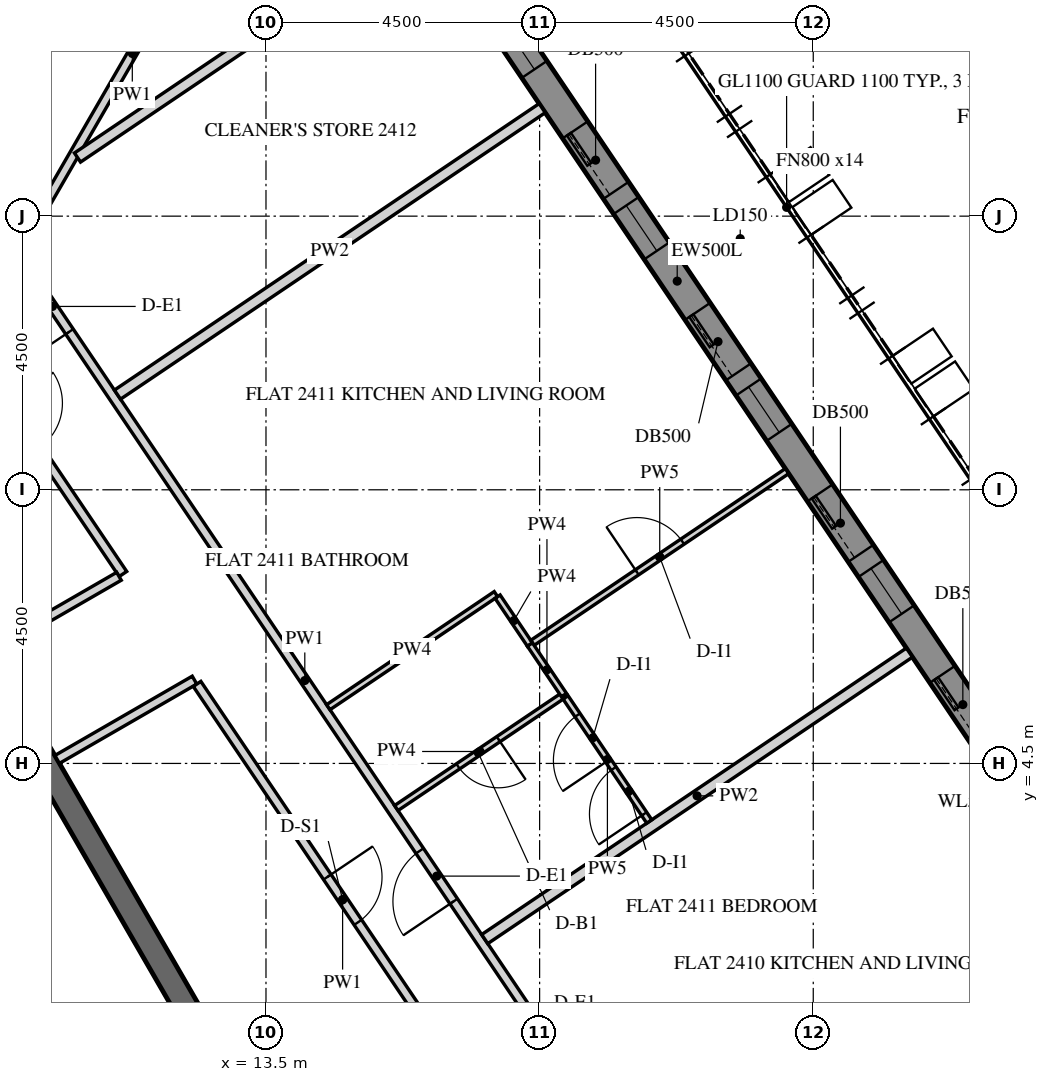
"""IFC4 building model, lengths in metres.
Left out: names, types, materials, properties, quantities, classifications, styles, units other than length and angle.
Written with IfcOpenShell. Run it as: python <this file> out.ifc"""

import sys

from ifc_helpers import new_model, si_unit, direction, frame, frame_2d, origin, place, context, subcontext, project, spatial, polyline, rectangle, outline, extrude, element, fill, save


model = new_model("IFC4")
c1 = context("Model", 3, precision=1e-05, world=origin(), true_north=direction((0.0, 1.0)))
c2 = subcontext(c1, "Body", "Model", "MODEL_VIEW")
j1 = project(units=[si_unit("LENGTHUNIT", "METRE"), si_unit("PLANEANGLEUNIT", "RADIAN")], contexts=[c1])
p1 = place(None, origin())
s1 = spatial("IfcSite", under=j1, at=p1, CompositionType="ELEMENT")
p2 = place(p1, origin())
s2 = spatial("IfcBuilding", under=s1, at=p2, CompositionType="ELEMENT")
p3 = place(p2, frame((0.0, 0.0, 303.0)))
s3 = spatial("IfcBuildingStorey", under=s2, at=p3, CompositionType="ELEMENT", Elevation=303.0)
p4 = place(p3, frame((26.706, 2.879, -0.15), z_axis=(0.0, 0.0, 1.0), x_axis=(-0.559197891507, 0.829034208061, 0.0)))
e1 = element("IfcWall", 1, at=p4, inside=s3, PredefinedType="SOLIDWALL", context=c2, shape_type="SweptSolid", body=[
    extrude(outline(polyline([(0.25, -0.25), (22.795, -0.25), (23.295, 0.25), (-0.25, 0.25), (0.25, -0.25)])), origin(), (0.0, 0.0, 1.0), 3.9),
])
p5 = place(p4, frame((1.323, 0.0, 1.05)))
e2 = element("IfcOpeningElement", 2, at=p5, cuts=e1, PredefinedType="OPENING", context=c2, shape_type="SweptSolid", body=[
    extrude(rectangle(XDim=0.9, YDim=1.5, at=frame_2d((0.45, 0.75))), frame((0.0, 0.26, 0.0), z_axis=(0.0, -1.0, 0.0), x_axis=(1.0, 0.0, 0.0)), (0.0, 0.0, 1.0), 0.52),
])
p6 = place(p4, frame((2.522, 0.0, 0.15)))
e3 = element("IfcOpeningElement", 3, at=p6, cuts=e1, PredefinedType="OPENING", context=c2, shape_type="SweptSolid", body=[
    extrude(rectangle(XDim=1.2, YDim=2.4, at=frame_2d((0.6, 1.2))), frame((0.0, 0.26, 0.0), z_axis=(0.0, -1.0, 0.0), x_axis=(1.0, 0.0, 0.0)), (0.0, 0.0, 1.0), 0.52),
])
p7 = place(p4, frame((4.922, 0.0, 1.05)))
e4 = element("IfcOpeningElement", 4, at=p7, cuts=e1, PredefinedType="OPENING", context=c2, shape_type="SweptSolid", body=[
    extrude(rectangle(XDim=0.9, YDim=1.5, at=frame_2d((0.45, 0.75))), frame((0.0, 0.26, 0.0), z_axis=(0.0, -1.0, 0.0), x_axis=(1.0, 0.0, 0.0)), (0.0, 0.0, 1.0), 0.52),
])
p8 = place(p4, frame((6.122, 0.0, 0.15)))
e5 = element("IfcOpeningElement", 5, at=p8, cuts=e1, PredefinedType="OPENING", context=c2, shape_type="SweptSolid", body=[
    extrude(rectangle(XDim=1.2, YDim=2.4, at=frame_2d((0.6, 1.2))), frame((0.0, 0.26, 0.0), z_axis=(0.0, -1.0, 0.0), x_axis=(1.0, 0.0, 0.0)), (0.0, 0.0, 1.0), 0.52),
])
p9 = place(p4, frame((8.522, 0.0, 1.05)))
e6 = element("IfcOpeningElement", 6, at=p9, cuts=e1, PredefinedType="OPENING", context=c2, shape_type="SweptSolid", body=[
    extrude(rectangle(XDim=0.9, YDim=1.5, at=frame_2d((0.45, 0.75))), frame((0.0, 0.26, 0.0), z_axis=(0.0, -1.0, 0.0), x_axis=(1.0, 0.0, 0.0)), (0.0, 0.0, 1.0), 0.52),
])
p10 = place(p4, frame((9.722, 0.0, 0.15)))
e7 = element("IfcOpeningElement", 7, at=p10, cuts=e1, PredefinedType="OPENING", context=c2, shape_type="SweptSolid", body=[
    extrude(rectangle(XDim=1.2, YDim=2.4, at=frame_2d((0.6, 1.2))), frame((0.0, 0.26, 0.0), z_axis=(0.0, -1.0, 0.0), x_axis=(1.0, 0.0, 0.0)), (0.0, 0.0, 1.0), 0.52),
])
p11 = place(p4, frame((12.122, 0.0, 1.05)))
e8 = element("IfcOpeningElement", 8, at=p11, cuts=e1, PredefinedType="OPENING", context=c2, shape_type="SweptSolid", body=[
    extrude(rectangle(XDim=0.9, YDim=1.5, at=frame_2d((0.45, 0.75))), frame((0.0, 0.26, 0.0), z_axis=(0.0, -1.0, 0.0), x_axis=(1.0, 0.0, 0.0)), (0.0, 0.0, 1.0), 0.52),
])
p12 = place(p4, frame((13.323, 0.0, 0.15)))
e9 = element("IfcOpeningElement", 9, at=p12, cuts=e1, PredefinedType="OPENING", context=c2, shape_type="SweptSolid", body=[
    extrude(rectangle(XDim=1.2, YDim=2.4, at=frame_2d((0.6, 1.2))), frame((0.0, 0.26, 0.0), z_axis=(0.0, -1.0, 0.0), x_axis=(1.0, 0.0, 0.0)), (0.0, 0.0, 1.0), 0.52),
])
p13 = place(p4, frame((15.722, 0.0, 1.05)))
e10 = element("IfcOpeningElement", 10, at=p13, cuts=e1, PredefinedType="OPENING", context=c2, shape_type="SweptSolid", body=[
    extrude(rectangle(XDim=0.9, YDim=1.5, at=frame_2d((0.45, 0.75))), frame((0.0, 0.26, 0.0), z_axis=(0.0, -1.0, 0.0), x_axis=(1.0, 0.0, 0.0)), (0.0, 0.0, 1.0), 0.52),
])
p14 = place(p4, frame((16.922, 0.0, 0.15)))
e11 = element("IfcOpeningElement", 11, at=p14, cuts=e1, PredefinedType="OPENING", context=c2, shape_type="SweptSolid", body=[
    extrude(rectangle(XDim=1.2, YDim=2.4, at=frame_2d((0.6, 1.2))), frame((0.0, 0.26, 0.0), z_axis=(0.0, -1.0, 0.0), x_axis=(1.0, 0.0, 0.0)), (0.0, 0.0, 1.0), 0.52),
])
p15 = place(p4, frame((19.323, 0.0, 1.05)))
e12 = element("IfcOpeningElement", 12, at=p15, cuts=e1, PredefinedType="OPENING", context=c2, shape_type="SweptSolid", body=[
    extrude(rectangle(XDim=0.9, YDim=1.5, at=frame_2d((0.45, 0.75))), frame((0.0, 0.26, 0.0), z_axis=(0.0, -1.0, 0.0), x_axis=(1.0, 0.0, 0.0)), (0.0, 0.0, 1.0), 0.52),
])
p16 = place(p4, frame((20.522, 0.0, 0.15)))
e13 = element("IfcOpeningElement", 13, at=p16, cuts=e1, PredefinedType="OPENING", context=c2, shape_type="SweptSolid", body=[
    extrude(rectangle(XDim=1.2, YDim=2.4, at=frame_2d((0.6, 1.2))), frame((0.0, 0.26, 0.0), z_axis=(0.0, -1.0, 0.0), x_axis=(1.0, 0.0, 0.0)), (0.0, 0.0, 1.0), 0.52),
])
p17 = place(p3, frame((12.471, 0.0, -0.15), z_axis=(0.0, 0.0, 1.0), x_axis=(-0.499996419489, 0.866027470984, 0.0)))
e14 = element("IfcWall", 14, at=p17, inside=s3, PredefinedType="SHEAR", context=c2, shape_type="SweptSolid", body=[
    extrude(outline(polyline([(-0.115, -0.2), (12.586, -0.2), (12.355, 0.2), (0.115, 0.2), (-0.115, -0.2)])), origin(), (0.0, 0.0, 1.0), 3.9),
])
p18 = place(p17, frame((5.306, 0.0, 0.15)))
e15 = element("IfcOpeningElement", 15, at=p18, cuts=e14, PredefinedType="OPENING", context=c2, shape_type="SweptSolid", body=[
    extrude(rectangle(XDim=1.8, YDim=2.4, at=frame_2d((0.9, 1.2))), frame((0.0, 0.21, 0.0), z_axis=(0.0, -1.0, 0.0), x_axis=(1.0, 0.0, 0.0)), (0.0, 0.0, 1.0), 0.42),
])
p19 = place(p3, frame((6.351, 11.0, -0.15), z_axis=(0.0, 0.0, 1.0), x_axis=(0.499998894578, 0.866026041999, 0.0)))
e16 = element("IfcWall", 16, at=p19, inside=s3, PredefinedType="SHEAR", context=c2, shape_type="SweptSolid", body=[
    extrude(rectangle(XDim=15.544, YDim=0.4, at=frame_2d((7.772, 0.0))), origin(), (0.0, 0.0, 1.0), 3.9),
])
p20 = place(p19, frame((6.872, 0.0, 0.15)))
e17 = element("IfcOpeningElement", 17, at=p20, cuts=e16, PredefinedType="OPENING", context=c2, shape_type="SweptSolid", body=[
    extrude(rectangle(XDim=1.8, YDim=2.4, at=frame_2d((0.9, 1.2))), frame((0.0, 0.21, 0.0), z_axis=(0.0, -1.0, 0.0), x_axis=(1.0, 0.0, 0.0)), (0.0, 0.0, 1.0), 0.42),
])
p21 = place(p3, frame((18.875, -1.158, 0.0), z_axis=(0.0, 0.0, 1.0), x_axis=(-0.55919880344, 0.829033592945, 0.0)))
e18 = element("IfcWall", 18, at=p21, inside=s3, PredefinedType="PARTITIONING", context=c2, shape_type="SweptSolid", body=[
    extrude(rectangle(XDim=16.939, YDim=0.15, at=frame_2d((8.47, 0.0))), origin(), (0.0, 0.0, 1.0), 2.988),
])
p22 = place(p21, frame((4.09, 0.0, 0.0)))
e19 = element("IfcOpeningElement", 19, at=p22, cuts=e18, PredefinedType="OPENING", context=c2, shape_type="SweptSolid", body=[
    extrude(rectangle(XDim=1.0, YDim=2.1, at=frame_2d((0.5, 1.05))), frame((0.0, 0.085, 0.0), z_axis=(0.0, -1.0, 0.0), x_axis=(1.0, 0.0, 0.0)), (0.0, 0.0, 1.0), 0.17),
])
p23 = place(p21, frame((15.39, 0.0, 0.0)))
e20 = element("IfcOpeningElement", 20, at=p23, cuts=e18, PredefinedType="OPENING", context=c2, shape_type="SweptSolid", body=[
    extrude(rectangle(XDim=1.0, YDim=2.1, at=frame_2d((0.5, 1.05))), frame((0.0, 0.085, 0.0), z_axis=(0.0, -1.0, 0.0), x_axis=(1.0, 0.0, 0.0)), (0.0, 0.0, 1.0), 0.17),
])
p24 = place(p3, frame((9.444, 12.957, 0.0), z_axis=(0.0, 0.0, 1.0), x_axis=(0.500004967958, 0.866022535513, 0.0)))
e21 = element("IfcWall", 21, at=p24, inside=s3, PredefinedType="PARTITIONING", context=c2, shape_type="SweptSolid", body=[
    extrude(rectangle(XDim=7.431, YDim=0.15, at=frame_2d((3.715, 0.0))), origin(), (0.0, 0.0, 1.0), 2.988),
])
p25 = place(p24, frame((4.03, 0.0, 0.0)))
e22 = element("IfcOpeningElement", 22, at=p25, cuts=e21, PredefinedType="OPENING", context=c2, shape_type="SweptSolid", body=[
    extrude(rectangle(XDim=1.0, YDim=2.1, at=frame_2d((0.5, 1.05))), frame((0.0, 0.085, 0.0), z_axis=(0.0, -1.0, 0.0), x_axis=(1.0, 0.0, 0.0)), (0.0, 0.0, 1.0), 0.17),
])
p26 = place(p3, frame((10.066, 4.566, 0.0), z_axis=(0.0, 0.0, 1.0), x_axis=(0.866034402474, 0.499984413489, 0.0)))
e23 = element("IfcWall", 23, at=p26, inside=s3, PredefinedType="PARTITIONING", context=c2, shape_type="SweptSolid", body=[
    extrude(rectangle(XDim=2.608, YDim=0.15, at=frame_2d((1.304, 0.0))), origin(), (0.0, 0.0, 1.0), 2.988),
])
p27 = place(p3, frame((12.367, 5.808, 0.0), z_axis=(0.0, 0.0, 1.0), x_axis=(0.559187256666, -0.829041381345, 0.0)))
e24 = element("IfcWall", 24, at=p27, inside=s3, PredefinedType="PARTITIONING", context=c2, shape_type="SweptSolid", body=[
    extrude(rectangle(XDim=8.56, YDim=0.15, at=frame_2d((4.28, 0.0))), origin(), (0.0, 0.0, 1.0), 2.988),
])
p28 = place(p27, frame((3.83, 0.0, 0.0)))
e25 = element("IfcOpeningElement", 25, at=p28, cuts=e24, PredefinedType="OPENING", context=c2, shape_type="SweptSolid", body=[
    extrude(rectangle(XDim=0.9, YDim=2.1, at=frame_2d((0.45, 1.05))), frame((0.0, 0.085, 0.0), z_axis=(0.0, -1.0, 0.0), x_axis=(1.0, 0.0, 0.0)), (0.0, 0.0, 1.0), 0.17),
])
p29 = place(p3, frame((7.861, 12.488, 0.0), z_axis=(0.0, 0.0, 1.0), x_axis=(0.559178186788, -0.829047498893, 0.0)))
e26 = element("IfcWall", 26, at=p29, inside=s3, PredefinedType="PARTITIONING", context=c2, shape_type="SweptSolid", body=[
    extrude(rectangle(XDim=5.878, YDim=0.15, at=frame_2d((2.939, 0.0))), origin(), (0.0, 0.0, 1.0), 2.988),
])
p30 = place(p29, frame((2.489, 0.0, 0.0)))
e27 = element("IfcOpeningElement", 27, at=p30, cuts=e26, PredefinedType="OPENING", context=c2, shape_type="SweptSolid", body=[
    extrude(rectangle(XDim=0.9, YDim=2.1, at=frame_2d((0.45, 1.05))), frame((0.0, 0.085, 0.0), z_axis=(0.0, -1.0, 0.0), x_axis=(1.0, 0.0, 0.0)), (0.0, 0.0, 1.0), 0.17),
])
p31 = place(p3, frame((11.082, 7.578, 0.0), z_axis=(0.0, 0.0, 1.0), x_axis=(-0.865993065409, -0.500056007527, 0.0)))
e28 = element("IfcWall", 28, at=p31, inside=s3, PredefinedType="PARTITIONING", context=c2, shape_type="SweptSolid", body=[
    extrude(rectangle(XDim=2.386, YDim=0.15, at=frame_2d((1.193, 0.0))), origin(), (0.0, 0.0, 1.0), 2.988),
])
p32 = place(p3, frame((24.082, 6.323, 0.0), z_axis=(0.0, 0.0, 1.0), x_axis=(-0.829037762759, -0.559192621481, 0.0)))
e29 = element("IfcWall", 29, at=p32, inside=s3, PredefinedType="PARTITIONING", context=c2, shape_type="SweptSolid", body=[
    extrude(rectangle(XDim=8.425, YDim=0.18, at=frame_2d((4.212, 0.0))), origin(), (0.0, 0.0, 1.0), 2.988),
])
p33 = place(p3, frame((14.525, 5.425, 0.0), z_axis=(0.0, 0.0, 1.0), x_axis=(0.82903334026, 0.559199178055, 0.0)))
e30 = element("IfcWall", 30, at=p33, inside=s3, PredefinedType="PARTITIONING", context=c2, shape_type="SweptSolid", body=[
    extrude(rectangle(XDim=3.325, YDim=0.1, at=frame_2d((1.663, 0.0))), origin(), (0.0, 0.0, 1.0), 2.988),
])
p34 = place(p3, frame((17.309, 7.243, 0.0), z_axis=(0.0, 0.0, 1.0), x_axis=(0.559248234521, -0.829000248604, 0.0)))
e31 = element("IfcWall", 31, at=p34, inside=s3, PredefinedType="PARTITIONING", context=c2, shape_type="SweptSolid", body=[
    extrude(rectangle(XDim=0.952, YDim=0.1, at=frame_2d((0.476, 0.0))), origin(), (0.0, 0.0, 1.0), 2.988),
])
p35 = place(p3, frame((17.882, 6.483, 0.0), z_axis=(0.0, 0.0, 1.0), x_axis=(0.829063268522, 0.559154805745, 0.0)))
e32 = element("IfcWall", 32, at=p35, inside=s3, PredefinedType="PARTITIONING", context=c2, shape_type="SweptSolid", body=[
    extrude(rectangle(XDim=5.05, YDim=0.1, at=frame_2d((2.525, 0.0))), origin(), (0.0, 0.0, 1.0), 2.988),
])
p36 = place(p35, frame((2.075, 0.0, 0.0)))
e33 = element("IfcOpeningElement", 33, at=p36, cuts=e32, PredefinedType="OPENING", context=c2, shape_type="SweptSolid", body=[
    extrude(rectangle(XDim=0.9, YDim=2.1, at=frame_2d((0.45, 1.05))), frame((0.0, 0.06, 0.0), z_axis=(0.0, -1.0, 0.0), x_axis=(1.0, 0.0, 0.0)), (0.0, 0.0, 1.0), 0.12),
])
p37 = place(p3, frame((18.042, 15.276, 0.0), z_axis=(0.0, 0.0, 1.0), x_axis=(-0.829037762759, -0.559192621481, 0.0)))
e34 = element("IfcWall", 34, at=p37, inside=s3, PredefinedType="PARTITIONING", context=c2, shape_type="SweptSolid", body=[
    extrude(rectangle(XDim=8.425, YDim=0.18, at=frame_2d((4.212, 0.0))), origin(), (0.0, 0.0, 1.0), 2.988),
])
p38 = place(p3, frame((18.4, 5.626, 0.0), z_axis=(0.0, 0.0, 1.0), x_axis=(-0.829067379225, -0.559148710725, 0.0)))
e35 = element("IfcWall", 35, at=p38, inside=s3, PredefinedType="PARTITIONING", context=c2, shape_type="SweptSolid", body=[
    extrude(rectangle(XDim=3.325, YDim=0.1, at=frame_2d((1.663, 0.0))), origin(), (0.0, 0.0, 1.0), 2.988),
])
p39 = place(p38, frame((1.3, 0.0, 0.0)))
e36 = element("IfcOpeningElement", 36, at=p39, cuts=e35, PredefinedType="OPENING", context=c2, shape_type="SweptSolid", body=[
    extrude(rectangle(XDim=0.8, YDim=2.1, at=frame_2d((0.4, 1.05))), frame((0.0, 0.06, 0.0), z_axis=(0.0, -1.0, 0.0), x_axis=(1.0, 0.0, 0.0)), (0.0, 0.0, 1.0), 0.12),
])
p40 = place(p3, frame((19.803, 3.545, 0.0), z_axis=(0.0, 0.0, 1.0), x_axis=(-0.559200318931, 0.829032570716, 0.0)))
e37 = element("IfcWall", 37, at=p40, inside=s3, PredefinedType="PARTITIONING", context=c2, shape_type="SweptSolid", body=[
    extrude(rectangle(XDim=2.462, YDim=0.1, at=frame_2d((1.231, 0.0))), origin(), (0.0, 0.0, 1.0), 2.988),
])
p41 = place(p40, frame((0.15, 0.0, 0.0)))
e38 = element("IfcOpeningElement", 38, at=p41, cuts=e37, PredefinedType="OPENING", context=c2, shape_type="SweptSolid", body=[
    extrude(rectangle(XDim=0.9, YDim=2.1, at=frame_2d((0.45, 1.05))), frame((0.0, 0.06, 0.0), z_axis=(0.0, -1.0, 0.0), x_axis=(1.0, 0.0, 0.0)), (0.0, 0.0, 1.0), 0.12),
])
p42 = place(p40, frame((1.21, 0.0, 0.0)))
e39 = element("IfcOpeningElement", 39, at=p42, cuts=e37, PredefinedType="OPENING", context=c2, shape_type="SweptSolid", body=[
    extrude(rectangle(XDim=0.9, YDim=2.1, at=frame_2d((0.45, 1.05))), frame((0.0, 0.06, 0.0), z_axis=(0.0, -1.0, 0.0), x_axis=(1.0, 0.0, 0.0)), (0.0, 0.0, 1.0), 0.12),
])
p43 = place(p3, frame((18.401, 5.624, 0.0), z_axis=(0.0, 0.0, 1.0), x_axis=(-0.559133879296, 0.829077381806, 0.0)))
e40 = element("IfcWall", 40, at=p43, inside=s3, PredefinedType="PARTITIONING", context=c2, shape_type="SweptSolid", body=[
    extrude(rectangle(XDim=1.002, YDim=0.1, at=frame_2d((0.501, 0.0))), origin(), (0.0, 0.0, 1.0), 2.988),
])
p44 = place(p3, frame((16.029, 18.26, 0.0), z_axis=(0.0, 0.0, 1.0), x_axis=(-0.82904538001, -0.559181328268, 0.0)))
e41 = element("IfcWall", 41, at=p44, inside=s3, PredefinedType="PARTITIONING", context=c2, shape_type="SweptSolid", body=[
    extrude(rectangle(XDim=6.79, YDim=0.18, at=frame_2d((3.395, 0.0))), origin(), (0.0, 0.0, 1.0), 2.988),
])
p45 = place(p6, frame((0.0, 0.175, 0.0)))
e42 = element("IfcDoor", 42, at=p45, inside=s3, OperationType="SLIDING_TO_LEFT", PredefinedType="DOOR", context=c2, shape_type="SweptSolid", body=[
    extrude(rectangle(XDim=1.2, YDim=2.4, at=frame_2d((0.6, 1.2))), frame((0.0, 0.025, 0.0), z_axis=(0.0, -1.0, 0.0), x_axis=(1.0, 0.0, 0.0)), (0.0, 0.0, 1.0), 0.05),
])
fill(e3, e42)
p46 = place(p7, frame((0.0, 0.18, 0.0)))
e43 = element("IfcWindow", 43, at=p46, inside=s3, PartitioningType="SINGLE_PANEL", PredefinedType="WINDOW", context=c2, shape_type="SweptSolid", body=[
    extrude(rectangle(XDim=0.9, YDim=1.5, at=frame_2d((0.45, 0.75))), frame((0.0, 0.03, 0.0), z_axis=(0.0, -1.0, 0.0), x_axis=(1.0, 0.0, 0.0)), (0.0, 0.0, 1.0), 0.06),
])
fill(e4, e43)
p47 = place(p8, frame((0.0, 0.175, 0.0)))
e44 = element("IfcDoor", 44, at=p47, inside=s3, OperationType="SLIDING_TO_LEFT", PredefinedType="DOOR", context=c2, shape_type="SweptSolid", body=[
    extrude(rectangle(XDim=1.2, YDim=2.4, at=frame_2d((0.6, 1.2))), frame((0.0, 0.025, 0.0), z_axis=(0.0, -1.0, 0.0), x_axis=(1.0, 0.0, 0.0)), (0.0, 0.0, 1.0), 0.05),
])
fill(e5, e44)
p48 = place(p9, frame((0.0, 0.18, 0.0)))
e45 = element("IfcWindow", 45, at=p48, inside=s3, PartitioningType="SINGLE_PANEL", PredefinedType="WINDOW", context=c2, shape_type="SweptSolid", body=[
    extrude(rectangle(XDim=0.9, YDim=1.5, at=frame_2d((0.45, 0.75))), frame((0.0, 0.03, 0.0), z_axis=(0.0, -1.0, 0.0), x_axis=(1.0, 0.0, 0.0)), (0.0, 0.0, 1.0), 0.06),
])
fill(e6, e45)
p49 = place(p10, frame((0.0, 0.175, 0.0)))
e46 = element("IfcDoor", 46, at=p49, inside=s3, OperationType="SLIDING_TO_LEFT", PredefinedType="DOOR", context=c2, shape_type="SweptSolid", body=[
    extrude(rectangle(XDim=1.2, YDim=2.4, at=frame_2d((0.6, 1.2))), frame((0.0, 0.025, 0.0), z_axis=(0.0, -1.0, 0.0), x_axis=(1.0, 0.0, 0.0)), (0.0, 0.0, 1.0), 0.05),
])
fill(e7, e46)
p50 = place(p11, frame((0.0, 0.18, 0.0)))
e47 = element("IfcWindow", 47, at=p50, inside=s3, PartitioningType="SINGLE_PANEL", PredefinedType="WINDOW", context=c2, shape_type="SweptSolid", body=[
    extrude(rectangle(XDim=0.9, YDim=1.5, at=frame_2d((0.45, 0.75))), frame((0.0, 0.03, 0.0), z_axis=(0.0, -1.0, 0.0), x_axis=(1.0, 0.0, 0.0)), (0.0, 0.0, 1.0), 0.06),
])
fill(e8, e47)
p51 = place(p12, frame((0.0, 0.175, 0.0)))
e48 = element("IfcDoor", 48, at=p51, inside=s3, OperationType="SLIDING_TO_LEFT", PredefinedType="DOOR", context=c2, shape_type="SweptSolid", body=[
    extrude(rectangle(XDim=1.2, YDim=2.4, at=frame_2d((0.6, 1.2))), frame((0.0, 0.025, 0.0), z_axis=(0.0, -1.0, 0.0), x_axis=(1.0, 0.0, 0.0)), (0.0, 0.0, 1.0), 0.05),
])
fill(e9, e48)
p52 = place(p13, frame((0.0, 0.18, 0.0)))
e49 = element("IfcWindow", 49, at=p52, inside=s3, PartitioningType="SINGLE_PANEL", PredefinedType="WINDOW", context=c2, shape_type="SweptSolid", body=[
    extrude(rectangle(XDim=0.9, YDim=1.5, at=frame_2d((0.45, 0.75))), frame((0.0, 0.03, 0.0), z_axis=(0.0, -1.0, 0.0), x_axis=(1.0, 0.0, 0.0)), (0.0, 0.0, 1.0), 0.06),
])
fill(e10, e49)
p53 = place(p22, origin())
e50 = element("IfcDoor", 50, at=p53, inside=s3, OperationType="SINGLE_SWING_LEFT", PredefinedType="DOOR", context=c2, shape_type="SweptSolid", body=[
    extrude(rectangle(XDim=1.0, YDim=2.1, at=frame_2d((0.5, 1.05))), frame((0.0, 0.025, 0.0), z_axis=(0.0, -1.0, 0.0), x_axis=(1.0, 0.0, 0.0)), (0.0, 0.0, 1.0), 0.05),
])
fill(e19, e50)
p54 = place(p39, origin())
e51 = element("IfcDoor", 51, at=p54, inside=s3, OperationType="SINGLE_SWING_LEFT", PredefinedType="DOOR", context=c2, shape_type="SweptSolid", body=[
    extrude(rectangle(XDim=0.8, YDim=2.1, at=frame_2d((0.4, 1.05))), frame((0.0, 0.025, 0.0), z_axis=(0.0, -1.0, 0.0), x_axis=(1.0, 0.0, 0.0)), (0.0, 0.0, 1.0), 0.05),
])
fill(e36, e51)
p55 = place(p41, origin())
e52 = element("IfcDoor", 52, at=p55, inside=s3, OperationType="SINGLE_SWING_LEFT", PredefinedType="DOOR", context=c2, shape_type="SweptSolid", body=[
    extrude(rectangle(XDim=0.9, YDim=2.1, at=frame_2d((0.45, 1.05))), frame((0.0, 0.025, 0.0), z_axis=(0.0, -1.0, 0.0), x_axis=(1.0, 0.0, 0.0)), (0.0, 0.0, 1.0), 0.05),
])
fill(e38, e52)
p56 = place(p42, origin())
e53 = element("IfcDoor", 53, at=p56, inside=s3, OperationType="SINGLE_SWING_LEFT", PredefinedType="DOOR", context=c2, shape_type="SweptSolid", body=[
    extrude(rectangle(XDim=0.9, YDim=2.1, at=frame_2d((0.45, 1.05))), frame((0.0, 0.025, 0.0), z_axis=(0.0, -1.0, 0.0), x_axis=(1.0, 0.0, 0.0)), (0.0, 0.0, 1.0), 0.05),
])
fill(e39, e53)
p57 = place(p23, origin())
e54 = element("IfcDoor", 54, at=p57, inside=s3, OperationType="SINGLE_SWING_LEFT", PredefinedType="DOOR", context=c2, shape_type="SweptSolid", body=[
    extrude(rectangle(XDim=1.0, YDim=2.1, at=frame_2d((0.5, 1.05))), frame((0.0, 0.025, 0.0), z_axis=(0.0, -1.0, 0.0), x_axis=(1.0, 0.0, 0.0)), (0.0, 0.0, 1.0), 0.05),
])
fill(e20, e54)
p58 = place(p36, origin())
e55 = element("IfcDoor", 55, at=p58, inside=s3, OperationType="SINGLE_SWING_LEFT", PredefinedType="DOOR", context=c2, shape_type="SweptSolid", body=[
    extrude(rectangle(XDim=0.9, YDim=2.1, at=frame_2d((0.45, 1.05))), frame((0.0, 0.025, 0.0), z_axis=(0.0, -1.0, 0.0), x_axis=(1.0, 0.0, 0.0)), (0.0, 0.0, 1.0), 0.05),
])
fill(e33, e55)
p59 = place(p28, origin())
e56 = element("IfcDoor", 56, at=p59, inside=s3, OperationType="SINGLE_SWING_RIGHT", PredefinedType="DOOR", context=c2, shape_type="SweptSolid", body=[
    extrude(rectangle(XDim=0.9, YDim=2.1, at=frame_2d((0.45, 1.05))), frame((0.0, 0.025, 0.0), z_axis=(0.0, -1.0, 0.0), x_axis=(1.0, 0.0, 0.0)), (0.0, 0.0, 1.0), 0.05),
])
fill(e25, e56)
save(model, sys.argv[1])
